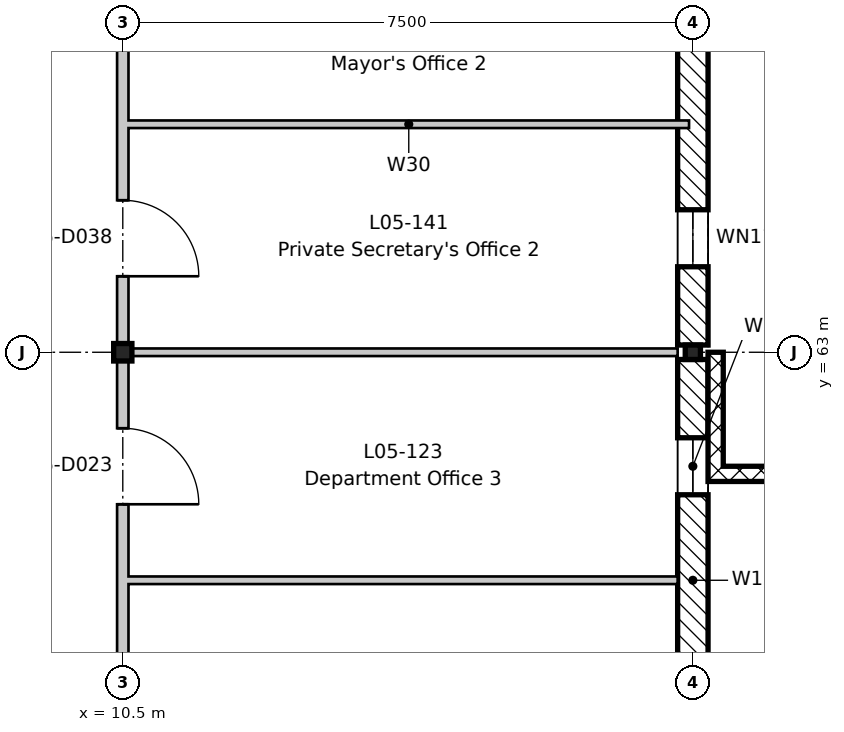
"""IFC4 building model, lengths in metres.
Left out: names, types, materials, properties, quantities, classifications, styles, units other than length and angle.
Written with IfcOpenShell. Run it as: python <this file> out.ifc"""

import sys

from ifc_helpers import new_model, si_unit, direction, frame, frame_2d, origin, origin_2d, place, context, subcontext, project, spatial, rectangle, i_section, extrude, element, fill, save


model = new_model("IFC4")
c1 = context("Model", 3, precision=1e-05, world=origin(), true_north=direction((0.0, 1.0)))
c2 = subcontext(c1, "Body", "Model", "MODEL_VIEW")
j1 = project(units=[si_unit("LENGTHUNIT", "METRE"), si_unit("PLANEANGLEUNIT", "RADIAN")], contexts=[c1])
p1 = place(None, origin())
s1 = spatial("IfcSite", under=j1, at=p1, CompositionType="ELEMENT")
p2 = place(p1, origin())
s2 = spatial("IfcBuilding", under=s1, at=p2, CompositionType="ELEMENT")
p3 = place(p2, frame((0.0, 0.0, 22.8)))
s3 = spatial("IfcBuildingStorey", under=s2, at=p3, CompositionType="ELEMENT", Elevation=22.8)
p4 = place(p3, frame((10.5, 63.0, -0.2), z_axis=(0.0, 0.0, 1.0), x_axis=(1.0, 0.0, 0.0)))
e1 = element("IfcColumn", 1, at=p4, inside=s3, PredefinedType="COLUMN", context=c2, shape_type="SweptSolid", body=[
    extrude(i_section(OverallWidth=0.24, OverallDepth=0.23, WebThickness=0.008, FlangeThickness=0.012, FilletRadius=0.021, at=origin_2d()), origin(), (0.0, 0.0, 1.0), 4.15),
])
p5 = place(p3, frame((18.0, 63.0, -0.2), z_axis=(0.0, 0.0, 1.0), x_axis=(1.0, 0.0, 0.0)))
e2 = element("IfcColumn", 2, at=p5, inside=s3, PredefinedType="COLUMN", context=c2, shape_type="SweptSolid", body=[
    extrude(i_section(OverallWidth=0.2, OverallDepth=0.19, WebThickness=0.007, FlangeThickness=0.01, FilletRadius=0.018, at=origin_2d()), origin(), (0.0, 0.0, 1.0), 4.15),
])
p6 = place(p3, frame((18.0, 62.905, 0.0), z_axis=(0.0, 0.0, 1.0), x_axis=(0.0, -1.0, 0.0)))
e3 = element("IfcWall", 3, at=p6, inside=s3, PredefinedType="STANDARD", context=c2, shape_type="SweptSolid", body=[
    extrude(rectangle(XDim=8.81, YDim=0.4, at=frame_2d((4.405, 0.0))), origin(), (0.0, 0.0, 1.0), 3.55),
])
p7 = place(p6, frame((7.03, 0.0, 1.5)))
e4 = element("IfcOpeningElement", 4, at=p7, cuts=e3, PredefinedType="OPENING", context=c2, shape_type="SweptSolid", body=[
    extrude(rectangle(XDim=0.75, YDim=1.2, at=frame_2d((0.375, 0.6))), frame((0.0, 0.21, 0.0), z_axis=(0.0, -1.0, 0.0), x_axis=(1.0, 0.0, 0.0)), (0.0, 0.0, 1.0), 0.42),
])
p8 = place(p6, frame((4.03, 0.0, 1.5)))
e5 = element("IfcOpeningElement", 5, at=p8, cuts=e3, PredefinedType="OPENING", context=c2, shape_type="SweptSolid", body=[
    extrude(rectangle(XDim=0.75, YDim=1.2, at=frame_2d((0.375, 0.6))), frame((0.0, 0.21, 0.0), z_axis=(0.0, -1.0, 0.0), x_axis=(1.0, 0.0, 0.0)), (0.0, 0.0, 1.0), 0.42),
])
p9 = place(p6, frame((1.03, 0.0, 1.5)))
e6 = element("IfcOpeningElement", 6, at=p9, cuts=e3, PredefinedType="OPENING", context=c2, shape_type="SweptSolid", body=[
    extrude(rectangle(XDim=0.75, YDim=1.2, at=frame_2d((0.375, 0.6))), frame((0.0, 0.21, 0.0), z_axis=(0.0, -1.0, 0.0), x_axis=(1.0, 0.0, 0.0)), (0.0, 0.0, 1.0), 0.42),
])
p10 = place(p3, frame((18.0, 70.405, 0.0), z_axis=(0.0, 0.0, 1.0), x_axis=(0.0, -1.0, 0.0)))
e7 = element("IfcWall", 7, at=p10, inside=s3, PredefinedType="STANDARD", context=c2, shape_type="SweptSolid", body=[
    extrude(rectangle(XDim=7.31, YDim=0.4, at=frame_2d((3.655, 0.0))), origin(), (0.0, 0.0, 1.0), 3.55),
])
p11 = place(p10, frame((5.53, 0.0, 1.5)))
e8 = element("IfcOpeningElement", 8, at=p11, cuts=e7, PredefinedType="OPENING", context=c2, shape_type="SweptSolid", body=[
    extrude(rectangle(XDim=0.75, YDim=1.2, at=frame_2d((0.375, 0.6))), frame((0.0, 0.21, 0.0), z_axis=(0.0, -1.0, 0.0), x_axis=(1.0, 0.0, 0.0)), (0.0, 0.0, 1.0), 0.42),
])
p12 = place(p10, frame((2.53, 0.0, 1.5)))
e9 = element("IfcOpeningElement", 9, at=p12, cuts=e7, PredefinedType="OPENING", context=c2, shape_type="SweptSolid", body=[
    extrude(rectangle(XDim=0.75, YDim=1.2, at=frame_2d((0.375, 0.6))), frame((0.0, 0.21, 0.0), z_axis=(0.0, -1.0, 0.0), x_axis=(1.0, 0.0, 0.0)), (0.0, 0.0, 1.0), 0.42),
])
p13 = place(p3, frame((55.5, 61.4, 0.0), z_axis=(0.0, 0.0, 1.0), x_axis=(-1.0, 0.0, 0.0)))
e10 = element("IfcWall", 10, at=p13, inside=s3, PredefinedType="PARAPET", context=c2, shape_type="SweptSolid", body=[
    extrude(rectangle(XDim=37.3, YDim=0.2, at=frame_2d((18.65, 0.0))), origin(), (0.0, 0.0, 1.0), 0.9),
])
p14 = place(p3, frame((18.3, 61.5, 0.0), z_axis=(0.0, 0.0, 1.0), x_axis=(0.0, 1.0, 0.0)))
e11 = element("IfcWall", 11, at=p14, inside=s3, PredefinedType="PARAPET", context=c2, shape_type="SweptSolid", body=[
    extrude(rectangle(XDim=1.5, YDim=0.2, at=frame_2d((0.75, 0.0))), origin(), (0.0, 0.0, 1.0), 0.9),
])
p15 = place(p3, frame((10.575, 60.0, 0.0), z_axis=(0.0, 0.0, 1.0), x_axis=(1.0, 0.0, 0.0)))
e12 = element("IfcWall", 12, at=p15, inside=s3, PredefinedType="PARTITIONING", context=c2, shape_type="SweptSolid", body=[
    extrude(rectangle(XDim=7.225, YDim=0.1, at=frame_2d((3.613, 0.0))), origin(), (0.0, 0.0, 1.0), 3.95),
])
p16 = place(p3, frame((10.575, 63.0, 0.0), z_axis=(0.0, 0.0, 1.0), x_axis=(1.0, 0.0, 0.0)))
e13 = element("IfcWall", 13, at=p16, inside=s3, PredefinedType="PARTITIONING", context=c2, shape_type="SweptSolid", body=[
    extrude(rectangle(XDim=7.225, YDim=0.1, at=frame_2d((3.613, 0.0))), origin(), (0.0, 0.0, 1.0), 3.6),
])
p17 = place(p3, frame((10.5, -8.8, 0.0), z_axis=(0.0, 0.0, 1.0), x_axis=(0.0, 1.0, 0.0)))
e14 = element("IfcWall", 14, at=p17, inside=s3, PredefinedType="PARTITIONING", context=c2, shape_type="SweptSolid", body=[
    extrude(rectangle(XDim=79.3, YDim=0.15, at=frame_2d((39.65, 0.0))), origin(), (0.0, 0.0, 1.0), 3.43),
])
p18 = place(p17, frame((3.6, 0.0, 0.0)))
e15 = element("IfcOpeningElement", 15, at=p18, cuts=e14, PredefinedType="OPENING", context=c2, shape_type="SweptSolid", body=[
    extrude(rectangle(XDim=1.4, YDim=2.1, at=frame_2d((0.7, 1.05))), frame((0.0, 0.085, 0.0), z_axis=(0.0, -1.0, 0.0), x_axis=(1.0, 0.0, 0.0)), (0.0, 0.0, 1.0), 0.17),
])
p19 = place(p17, frame((9.8, 0.0, 0.0)))
e16 = element("IfcOpeningElement", 16, at=p19, cuts=e14, PredefinedType="OPENING", context=c2, shape_type="SweptSolid", body=[
    extrude(rectangle(XDim=1.0, YDim=2.1, at=frame_2d((0.5, 1.05))), frame((0.0, 0.085, 0.0), z_axis=(0.0, -1.0, 0.0), x_axis=(1.0, 0.0, 0.0)), (0.0, 0.0, 1.0), 0.17),
])
p20 = place(p17, frame((14.3, 0.0, 0.0)))
e17 = element("IfcOpeningElement", 17, at=p20, cuts=e14, PredefinedType="OPENING", context=c2, shape_type="SweptSolid", body=[
    extrude(rectangle(XDim=1.0, YDim=2.1, at=frame_2d((0.5, 1.05))), frame((0.0, 0.085, 0.0), z_axis=(0.0, -1.0, 0.0), x_axis=(1.0, 0.0, 0.0)), (0.0, 0.0, 1.0), 0.17),
])
p21 = place(p17, frame((20.3, 0.0, 0.0)))
e18 = element("IfcOpeningElement", 18, at=p21, cuts=e14, PredefinedType="OPENING", context=c2, shape_type="SweptSolid", body=[
    extrude(rectangle(XDim=1.0, YDim=2.1, at=frame_2d((0.5, 1.05))), frame((0.0, 0.085, 0.0), z_axis=(0.0, -1.0, 0.0), x_axis=(1.0, 0.0, 0.0)), (0.0, 0.0, 1.0), 0.17),
])
p22 = place(p17, frame((27.6, 0.0, 0.0)))
e19 = element("IfcOpeningElement", 19, at=p22, cuts=e14, PredefinedType="OPENING", context=c2, shape_type="SweptSolid", body=[
    extrude(rectangle(XDim=1.4, YDim=2.1, at=frame_2d((0.7, 1.05))), frame((0.0, 0.085, 0.0), z_axis=(0.0, -1.0, 0.0), x_axis=(1.0, 0.0, 0.0)), (0.0, 0.0, 1.0), 0.17),
])
p23 = place(p17, frame((33.8, 0.0, 0.0)))
e20 = element("IfcOpeningElement", 20, at=p23, cuts=e14, PredefinedType="OPENING", context=c2, shape_type="SweptSolid", body=[
    extrude(rectangle(XDim=1.0, YDim=2.1, at=frame_2d((0.5, 1.05))), frame((0.0, 0.085, 0.0), z_axis=(0.0, -1.0, 0.0), x_axis=(1.0, 0.0, 0.0)), (0.0, 0.0, 1.0), 0.17),
])
p24 = place(p17, frame((36.8, 0.0, 0.0)))
e21 = element("IfcOpeningElement", 21, at=p24, cuts=e14, PredefinedType="OPENING", context=c2, shape_type="SweptSolid", body=[
    extrude(rectangle(XDim=1.0, YDim=2.1, at=frame_2d((0.5, 1.05))), frame((0.0, 0.085, 0.0), z_axis=(0.0, -1.0, 0.0), x_axis=(1.0, 0.0, 0.0)), (0.0, 0.0, 1.0), 0.17),
])
p25 = place(p17, frame((39.8, 0.0, 0.0)))
e22 = element("IfcOpeningElement", 22, at=p25, cuts=e14, PredefinedType="OPENING", context=c2, shape_type="SweptSolid", body=[
    extrude(rectangle(XDim=1.0, YDim=2.1, at=frame_2d((0.5, 1.05))), frame((0.0, 0.085, 0.0), z_axis=(0.0, -1.0, 0.0), x_axis=(1.0, 0.0, 0.0)), (0.0, 0.0, 1.0), 0.17),
])
p26 = place(p17, frame((45.55, 0.0, 0.0)))
e23 = element("IfcOpeningElement", 23, at=p26, cuts=e14, PredefinedType="OPENING", context=c2, shape_type="SweptSolid", body=[
    extrude(rectangle(XDim=1.0, YDim=2.1, at=frame_2d((0.5, 1.05))), frame((0.0, 0.085, 0.0), z_axis=(0.0, -1.0, 0.0), x_axis=(1.0, 0.0, 0.0)), (0.0, 0.0, 1.0), 0.17),
])
p27 = place(p17, frame((48.8, 0.0, 0.0)))
e24 = element("IfcOpeningElement", 24, at=p27, cuts=e14, PredefinedType="OPENING", context=c2, shape_type="SweptSolid", body=[
    extrude(rectangle(XDim=1.0, YDim=2.1, at=frame_2d((0.5, 1.05))), frame((0.0, 0.085, 0.0), z_axis=(0.0, -1.0, 0.0), x_axis=(1.0, 0.0, 0.0)), (0.0, 0.0, 1.0), 0.17),
])
p28 = place(p17, frame((51.8, 0.0, 0.0)))
e25 = element("IfcOpeningElement", 25, at=p28, cuts=e14, PredefinedType="OPENING", context=c2, shape_type="SweptSolid", body=[
    extrude(rectangle(XDim=1.0, YDim=2.1, at=frame_2d((0.5, 1.05))), frame((0.0, 0.085, 0.0), z_axis=(0.0, -1.0, 0.0), x_axis=(1.0, 0.0, 0.0)), (0.0, 0.0, 1.0), 0.17),
])
p29 = place(p17, frame((57.6, 0.0, 0.0)))
e26 = element("IfcOpeningElement", 26, at=p29, cuts=e14, PredefinedType="OPENING", context=c2, shape_type="SweptSolid", body=[
    extrude(rectangle(XDim=1.4, YDim=2.1, at=frame_2d((0.7, 1.05))), frame((0.0, 0.085, 0.0), z_axis=(0.0, -1.0, 0.0), x_axis=(1.0, 0.0, 0.0)), (0.0, 0.0, 1.0), 0.17),
])
p30 = place(p17, frame((65.3, 0.0, 0.0)))
e27 = element("IfcOpeningElement", 27, at=p30, cuts=e14, PredefinedType="OPENING", context=c2, shape_type="SweptSolid", body=[
    extrude(rectangle(XDim=1.0, YDim=2.1, at=frame_2d((0.5, 1.05))), frame((0.0, 0.085, 0.0), z_axis=(0.0, -1.0, 0.0), x_axis=(1.0, 0.0, 0.0)), (0.0, 0.0, 1.0), 0.17),
])
p31 = place(p17, frame((69.8, 0.0, 0.0)))
e28 = element("IfcOpeningElement", 28, at=p31, cuts=e14, PredefinedType="OPENING", context=c2, shape_type="SweptSolid", body=[
    extrude(rectangle(XDim=1.0, YDim=2.1, at=frame_2d((0.5, 1.05))), frame((0.0, 0.085, 0.0), z_axis=(0.0, -1.0, 0.0), x_axis=(1.0, 0.0, 0.0)), (0.0, 0.0, 1.0), 0.17),
])
p32 = place(p17, frame((72.8, 0.0, 0.0)))
e29 = element("IfcOpeningElement", 29, at=p32, cuts=e14, PredefinedType="OPENING", context=c2, shape_type="SweptSolid", body=[
    extrude(rectangle(XDim=1.0, YDim=2.1, at=frame_2d((0.5, 1.05))), frame((0.0, 0.085, 0.0), z_axis=(0.0, -1.0, 0.0), x_axis=(1.0, 0.0, 0.0)), (0.0, 0.0, 1.0), 0.17),
])
p33 = place(p3, frame((10.575, 66.0, 0.0), z_axis=(0.0, 0.0, 1.0), x_axis=(1.0, 0.0, 0.0)))
e30 = element("IfcWall", 30, at=p33, inside=s3, PredefinedType="PARTITIONING", context=c2, shape_type="SweptSolid", body=[
    extrude(rectangle(XDim=7.375, YDim=0.1, at=frame_2d((3.688, 0.0))), origin(), (0.0, 0.0, 1.0), 3.95),
])
p34 = place(p9, origin())
e31 = element("IfcWindow", 31, at=p34, inside=s3, PartitioningType="SINGLE_PANEL", PredefinedType="WINDOW", context=c2, shape_type="SweptSolid", body=[
    extrude(rectangle(XDim=0.75, YDim=1.2, at=frame_2d((0.375, 0.6))), frame((0.0, -0.12, 0.0), z_axis=(0.0, -1.0, 0.0), x_axis=(1.0, 0.0, 0.0)), (0.0, 0.0, 1.0), 0.06),
])
fill(e6, e31)
p35 = place(p11, origin())
e32 = element("IfcWindow", 32, at=p35, inside=s3, PartitioningType="SINGLE_PANEL", PredefinedType="WINDOW", context=c2, shape_type="SweptSolid", body=[
    extrude(rectangle(XDim=0.75, YDim=1.2, at=frame_2d((0.375, 0.6))), frame((0.0, -0.12, 0.0), z_axis=(0.0, -1.0, 0.0), x_axis=(1.0, 0.0, 0.0)), (0.0, 0.0, 1.0), 0.06),
])
fill(e8, e32)
p36 = place(p31, frame((1.0, 0.0, 0.0), z_axis=(0.0, 0.0, 1.0), x_axis=(-1.0, 0.0, 0.0)))
e33 = element("IfcDoor", 33, at=p36, inside=s3, OperationType="SINGLE_SWING_RIGHT", PredefinedType="DOOR", context=c2, shape_type="SweptSolid", body=[
    extrude(rectangle(XDim=1.0, YDim=2.1, at=frame_2d((0.5, 1.05))), frame((0.0, 0.025, 0.0), z_axis=(0.0, -1.0, 0.0), x_axis=(1.0, 0.0, 0.0)), (0.0, 0.0, 1.0), 0.05),
])
fill(e28, e33)
p37 = place(p32, frame((1.0, 0.0, 0.0), z_axis=(0.0, 0.0, 1.0), x_axis=(-1.0, 0.0, 0.0)))
e34 = element("IfcDoor", 34, at=p37, inside=s3, OperationType="SINGLE_SWING_RIGHT", PredefinedType="DOOR", context=c2, shape_type="SweptSolid", body=[
    extrude(rectangle(XDim=1.0, YDim=2.1, at=frame_2d((0.5, 1.05))), frame((0.0, 0.025, 0.0), z_axis=(0.0, -1.0, 0.0), x_axis=(1.0, 0.0, 0.0)), (0.0, 0.0, 1.0), 0.05),
])
fill(e29, e34)
save(model, sys.argv[1])
